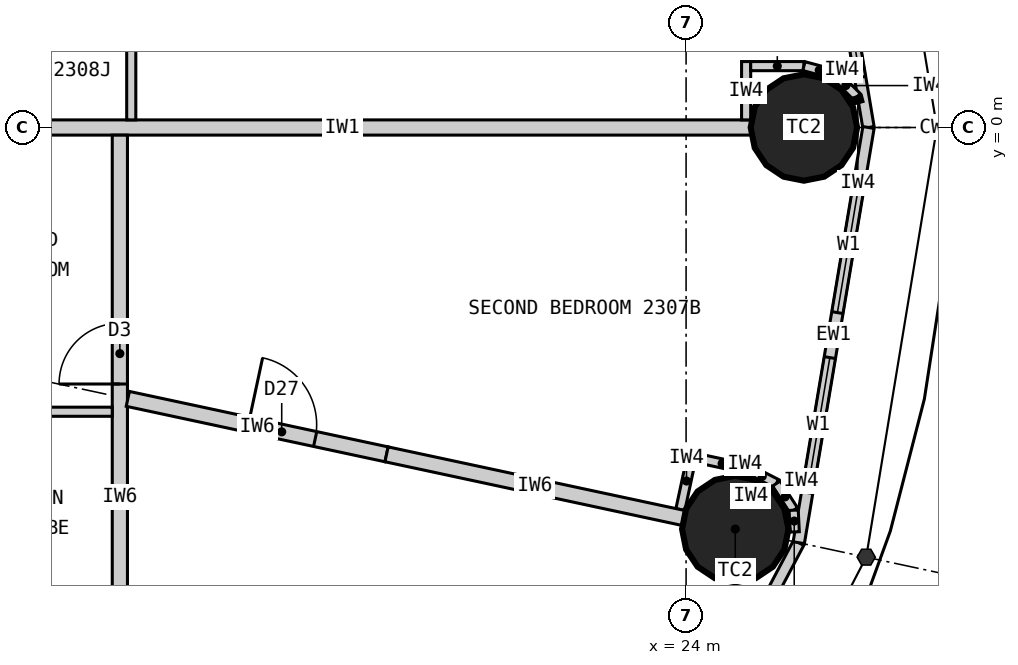
"""IFC4 building model, lengths in metres.
Left out: names, types, materials, properties, quantities, classifications, styles, units other than length and angle.
Written with IfcOpenShell. Run it as: python <this file> out.ifc"""

import sys

from ifc_helpers import new_model, si_unit, direction, frame, frame_2d, origin, origin_2d, place, context, subcontext, project, spatial, rectangle, circle, extrude, clip, halfspace, element, fill, save


model = new_model("IFC4")
c1 = context("Model", 3, precision=1e-05, world=origin(), true_north=direction((0.0, 1.0)))
c2 = subcontext(c1, "Body", "Model", "MODEL_VIEW")
j1 = project(units=[si_unit("LENGTHUNIT", "METRE"), si_unit("PLANEANGLEUNIT", "RADIAN")], contexts=[c1])
p1 = place(None, origin())
s1 = spatial("IfcSite", under=j1, at=p1, CompositionType="ELEMENT")
p2 = place(p1, origin())
s2 = spatial("IfcBuilding", under=s1, at=p2, CompositionType="ELEMENT")
p3 = place(p2, frame((0.0, 0.0, 90.3)))
s3 = spatial("IfcBuildingStorey", under=s2, at=p3, CompositionType="ELEMENT", Elevation=90.3)
for number, where, z_axis, x_axis in (
    (1, (25.55, 0.0, 0.0), (0.0, 0.0, 1.0), (1.0, 0.0, 0.0)),
    (2, (24.647, -5.283, 0.0), (0.0, 0.0, 1.0), (1.0, 0.0, 0.0)),
):
    element("IfcColumn", number, at=place(p3, frame(where, z_axis=z_axis, x_axis=x_axis)), inside=s3, PredefinedType="COLUMN", context=c2, shape_type="Clipping", body=[
        clip(extrude(circle(Radius=0.7, at=origin_2d()), origin(), (0.0, 0.0, 1.0), 3.3), halfspace(frame((0.0, 0.0, 2.25), z_axis=(0.0, 0.0, 1.0), x_axis=(1.0, 0.0, 0.0)), False)),
    ])
p4 = place(p3, frame((26.4, 0.0, 0.0), z_axis=(0.0, 0.0, 1.0), x_axis=(-0.165642551694, 0.986185857264, 0.0)))
e3 = element("IfcWall", 3, at=p4, inside=s3, PredefinedType="ELEMENTEDWALL", context=c2, shape_type="SweptSolid", body=[
    extrude(rectangle(XDim=5.539, YDim=0.15, at=frame_2d((2.77, 0.0))), origin(), (0.0, 0.0, 1.0), 3.05),
])
p5 = place(p4, frame((0.669, 0.0, 0.9)))
e4 = element("IfcOpeningElement", 4, at=p5, cuts=e3, PredefinedType="OPENING", context=c2, shape_type="SweptSolid", body=[
    extrude(rectangle(XDim=1.8, YDim=1.9, at=frame_2d((0.9, 0.95))), frame((0.0, 0.085, 0.0), z_axis=(0.0, -1.0, 0.0), x_axis=(1.0, 0.0, 0.0)), (0.0, 0.0, 1.0), 0.17),
])
p6 = place(p4, frame((3.07, 0.0, 0.9)))
e5 = element("IfcOpeningElement", 5, at=p6, cuts=e3, PredefinedType="OPENING", context=c2, shape_type="SweptSolid", body=[
    extrude(rectangle(XDim=1.8, YDim=1.9, at=frame_2d((0.9, 0.95))), frame((0.0, 0.085, 0.0), z_axis=(0.0, -1.0, 0.0), x_axis=(1.0, 0.0, 0.0)), (0.0, 0.0, 1.0), 0.17),
])
p7 = place(p3, frame((22.803, -10.532, 0.0), z_axis=(0.0, 0.0, 1.0), x_axis=(0.467296867008, 0.884100468321, 0.0)))
e6 = element("IfcWall", 6, at=p7, inside=s3, PredefinedType="ELEMENTEDWALL", context=c2, shape_type="SweptSolid", body=[
    extrude(rectangle(XDim=5.734, YDim=0.15, at=frame_2d((2.867, 0.0))), origin(), (0.0, 0.0, 1.0), 3.05),
])
p8 = place(p7, frame((0.767, 0.0, 0.9)))
e7 = element("IfcOpeningElement", 7, at=p8, cuts=e6, PredefinedType="OPENING", context=c2, shape_type="SweptSolid", body=[
    extrude(rectangle(XDim=1.8, YDim=1.9, at=frame_2d((0.9, 0.95))), frame((0.0, 0.085, 0.0), z_axis=(0.0, -1.0, 0.0), x_axis=(1.0, 0.0, 0.0)), (0.0, 0.0, 1.0), 0.17),
])
p9 = place(p7, frame((3.167, 0.0, 0.9)))
e8 = element("IfcOpeningElement", 8, at=p9, cuts=e6, PredefinedType="OPENING", context=c2, shape_type="SweptSolid", body=[
    extrude(rectangle(XDim=1.8, YDim=1.9, at=frame_2d((0.9, 0.95))), frame((0.0, 0.085, 0.0), z_axis=(0.0, -1.0, 0.0), x_axis=(1.0, 0.0, 0.0)), (0.0, 0.0, 1.0), 0.17),
])
p10 = place(p3, frame((25.482, -5.462, 0.0), z_axis=(0.0, 0.0, 1.0), x_axis=(0.165642551694, 0.986185857264, 0.0)))
e9 = element("IfcWall", 9, at=p10, inside=s3, PredefinedType="ELEMENTEDWALL", context=c2, shape_type="SweptSolid", body=[
    extrude(rectangle(XDim=5.539, YDim=0.15, at=frame_2d((2.77, 0.0))), origin(), (0.0, 0.0, 1.0), 3.05),
])
p11 = place(p10, frame((0.669, 0.0, 0.9)))
e10 = element("IfcOpeningElement", 10, at=p11, cuts=e9, PredefinedType="OPENING", context=c2, shape_type="SweptSolid", body=[
    extrude(rectangle(XDim=1.8, YDim=1.9, at=frame_2d((0.9, 0.95))), frame((0.0, 0.085, 0.0), z_axis=(0.0, -1.0, 0.0), x_axis=(1.0, 0.0, 0.0)), (0.0, 0.0, 1.0), 0.17),
])
p12 = place(p10, frame((3.07, 0.0, 0.9)))
e11 = element("IfcOpeningElement", 11, at=p12, cuts=e9, PredefinedType="OPENING", context=c2, shape_type="SweptSolid", body=[
    extrude(rectangle(XDim=1.8, YDim=1.9, at=frame_2d((0.9, 0.95))), frame((0.0, 0.085, 0.0), z_axis=(0.0, -1.0, 0.0), x_axis=(1.0, 0.0, 0.0)), (0.0, 0.0, 1.0), 0.17),
])
p13 = place(p3, frame((14.1, 0.0, 0.0), z_axis=(0.0, 0.0, 1.0), x_axis=(1.0, 0.0, 0.0)))
e12 = element("IfcWall", 12, at=p13, inside=s3, PredefinedType="PARTITIONING", context=c2, shape_type="SweptSolid", body=[
    extrude(rectangle(XDim=10.75, YDim=0.2, at=frame_2d((5.375, 0.0))), origin(), (0.0, 0.0, 1.0), 2.25),
])
p14 = place(p3, frame((16.55, -9.609, 0.0), z_axis=(0.0, 0.0, 1.0), x_axis=(0.0, 1.0, 0.0)))
e13 = element("IfcWall", 13, at=p14, inside=s3, PredefinedType="PARTITIONING", context=c2, shape_type="SweptSolid", body=[
    extrude(rectangle(XDim=9.508, YDim=0.2, at=frame_2d((4.754, 0.0))), origin(), (0.0, 0.0, 1.0), 3.05),
])
p15 = place(p14, frame((6.234, 0.0, 0.0)))
e14 = element("IfcOpeningElement", 14, at=p15, cuts=e13, PredefinedType="OPENING", context=c2, shape_type="SweptSolid", body=[
    extrude(rectangle(XDim=0.8, YDim=2.1, at=frame_2d((0.4, 1.05))), frame((0.0, 0.11, 0.0), z_axis=(0.0, -1.0, 0.0), x_axis=(1.0, 0.0, 0.0)), (0.0, 0.0, 1.0), 0.22),
])
p16 = place(p3, frame((16.655, -3.57, 0.0), z_axis=(0.0, 0.0, 1.0), x_axis=(0.977788045219, -0.209596132183, 0.0)))
e15 = element("IfcWall", 15, at=p16, inside=s3, PredefinedType="PARTITIONING", context=c2, shape_type="SweptSolid", body=[
    extrude(rectangle(XDim=3.482, YDim=0.2, at=frame_2d((1.741, 0.0))), origin(), (0.0, 0.0, 1.0), 3.05),
])
p17 = place(p16, frame((1.621, 0.0, 0.0)))
e16 = element("IfcOpeningElement", 16, at=p17, cuts=e15, PredefinedType="OPENING", context=c2, shape_type="SweptSolid", body=[
    extrude(rectangle(XDim=0.9, YDim=2.1, at=frame_2d((0.45, 1.05))), frame((0.0, 0.11, 0.0), z_axis=(0.0, -1.0, 0.0), x_axis=(1.0, 0.0, 0.0)), (0.0, 0.0, 1.0), 0.22),
])
p18 = place(p3, frame((14.1, -3.74, 0.0), z_axis=(0.0, 0.0, 1.0), x_axis=(1.0, 0.0, 0.0)))
e17 = element("IfcWall", 17, at=p18, inside=s3, PredefinedType="PARTITIONING", context=c2, shape_type="SweptSolid", body=[
    extrude(rectangle(XDim=2.35, YDim=0.12, at=frame_2d((1.175, 0.0))), origin(), (0.0, 0.0, 1.0), 2.05),
])
p19 = place(p3, frame((16.7, 0.1, 0.0), z_axis=(0.0, 0.0, 1.0), x_axis=(0.0, 1.0, 0.0)))
e18 = element("IfcWall", 18, at=p19, inside=s3, PredefinedType="PARTITIONING", context=c2, shape_type="SweptSolid", body=[
    extrude(rectangle(XDim=2.34, YDim=0.12, at=frame_2d((1.17, 0.0))), origin(), (0.0, 0.0, 1.0), 3.05),
])
p20 = place(p3, frame((24.79, 0.1, 0.0), z_axis=(0.0, 0.0, 1.0), x_axis=(0.0, 1.0, 0.0)))
e19 = element("IfcWall", 19, at=p20, inside=s3, PredefinedType="PARTITIONING", context=c2, shape_type="SweptSolid", body=[
    extrude(rectangle(XDim=0.767, YDim=0.12, at=frame_2d((0.384, 0.0))), origin(), (0.0, 0.0, 1.0), 3.05),
])
p21 = place(p3, frame((24.85, 0.808, 0.0), z_axis=(0.0, 0.0, 1.0), x_axis=(1.0, 0.0, 0.0)))
e20 = element("IfcWall", 20, at=p21, inside=s3, PredefinedType="PARTITIONING", context=c2, shape_type="SweptSolid", body=[
    extrude(rectangle(XDim=0.7, YDim=0.12, at=frame_2d((0.35, 0.0))), origin(), (0.0, 0.0, 1.0), 3.05),
])
p22 = place(p3, frame((25.55, 0.808, 0.0), z_axis=(0.0, 0.0, 1.0), x_axis=(0.965807183573, -0.2592614205, 0.0)))
e21 = element("IfcWall", 21, at=p22, inside=s3, PredefinedType="PARTITIONING", context=c2, shape_type="SweptSolid", body=[
    extrude(rectangle(XDim=0.418, YDim=0.12, at=frame_2d((0.209, 0.0))), origin(), (0.0, 0.0, 1.0), 3.05),
])
p23 = place(p3, frame((25.954, 0.699, 0.0), z_axis=(0.0, 0.0, 1.0), x_axis=(0.707106781187, -0.707106781187, 0.0)))
e22 = element("IfcWall", 22, at=p23, inside=s3, PredefinedType="PARTITIONING", context=c2, shape_type="SweptSolid", body=[
    extrude(rectangle(XDim=0.418, YDim=0.12, at=frame_2d((0.209, 0.0))), origin(), (0.0, 0.0, 1.0), 3.05),
])
p24 = place(p3, frame((26.249, 0.404, 0.0), z_axis=(0.0, 0.0, 1.0), x_axis=(0.259754282609, -0.965674744759, 0.0)))
e23 = element("IfcWall", 23, at=p24, inside=s3, PredefinedType="PARTITIONING", context=c2, shape_type="SweptSolid", body=[
    extrude(rectangle(XDim=0.08, YDim=0.12, at=frame_2d((0.04, 0.0))), origin(), (0.0, 0.0, 1.0), 3.05),
])
p25 = place(p3, frame((23.925, -5.026, 0.0), z_axis=(0.0, 0.0, 1.0), x_axis=(0.209681192172, 0.977769808109, 0.0)))
e24 = element("IfcWall", 24, at=p25, inside=s3, PredefinedType="PARTITIONING", context=c2, shape_type="SweptSolid", body=[
    extrude(rectangle(XDim=0.767, YDim=0.12, at=frame_2d((0.384, 0.0))), origin(), (0.0, 0.0, 1.0), 3.05),
])
p26 = place(p3, frame((24.132, -4.347, 0.0), z_axis=(0.0, 0.0, 1.0), x_axis=(0.977776882509, -0.209648200638, 0.0)))
e25 = element("IfcWall", 25, at=p26, inside=s3, PredefinedType="PARTITIONING", context=c2, shape_type="SweptSolid", body=[
    extrude(rectangle(XDim=0.7, YDim=0.12, at=frame_2d((0.35, 0.0))), origin(), (0.0, 0.0, 1.0), 3.05),
])
for number, where, z_axis, x_axis in (
    (26, (24.816, -4.494, 0.0), (0.0, 0.0, 1.0), (0.89, -0.455, 0.0)),
    (27, (25.188, -4.684, 0.0), (0.0, 0.0, 1.0), (0.543, -0.84, 0.0)),
):
    element("IfcWall", number, at=place(p3, frame(where, z_axis=z_axis, x_axis=x_axis)), inside=s3, PredefinedType="PARTITIONING", context=c2, shape_type="SweptSolid", body=[
        extrude(rectangle(XDim=0.418, YDim=0.12, at=frame_2d((0.209, 0.0))), origin(), (0.0, 0.0, 1.0), 3.05),
    ])
p27 = place(p3, frame((25.416, -5.035, 0.0), z_axis=(0.0, 0.0, 1.0), x_axis=(0.050406329159, -0.998728793007, 0.0)))
e28 = element("IfcWall", 28, at=p27, inside=s3, PredefinedType="PARTITIONING", context=c2, shape_type="SweptSolid", body=[
    extrude(rectangle(XDim=0.286, YDim=0.12, at=frame_2d((0.143, 0.0))), origin(), (0.0, 0.0, 1.0), 3.05),
])
p28 = place(p3, frame((20.059, -4.3, 0.0), z_axis=(0.0, 0.0, 1.0), x_axis=(0.977792568683, -0.209575028637, 0.0)))
e29 = element("IfcWall", 29, at=p28, inside=s3, PredefinedType="PARTITIONING", context=c2, shape_type="SweptSolid", body=[
    extrude(rectangle(XDim=3.992, YDim=0.2, at=frame_2d((1.996, 0.0))), origin(), (0.0, 0.0, 1.0), 2.05),
])
p29 = place(p5, origin())
e30 = element("IfcWindow", 30, at=p29, inside=s3, PartitioningType="SINGLE_PANEL", PredefinedType="WINDOW", context=c2, shape_type="SweptSolid", body=[
    extrude(rectangle(XDim=1.8, YDim=1.9, at=frame_2d((0.9, 0.95))), frame((0.0, 0.03, 0.0), z_axis=(0.0, -1.0, 0.0), x_axis=(1.0, 0.0, 0.0)), (0.0, 0.0, 1.0), 0.06),
])
fill(e4, e30)
p30 = place(p11, origin())
e31 = element("IfcWindow", 31, at=p30, inside=s3, PartitioningType="SINGLE_PANEL", PredefinedType="WINDOW", context=c2, shape_type="SweptSolid", body=[
    extrude(rectangle(XDim=1.8, YDim=1.9, at=frame_2d((0.9, 0.95))), frame((0.0, 0.03, 0.0), z_axis=(0.0, -1.0, 0.0), x_axis=(1.0, 0.0, 0.0)), (0.0, 0.0, 1.0), 0.06),
])
fill(e10, e31)
p31 = place(p12, origin())
e32 = element("IfcWindow", 32, at=p31, inside=s3, PartitioningType="SINGLE_PANEL", PredefinedType="WINDOW", context=c2, shape_type="SweptSolid", body=[
    extrude(rectangle(XDim=1.8, YDim=1.9, at=frame_2d((0.9, 0.95))), frame((0.0, 0.03, 0.0), z_axis=(0.0, -1.0, 0.0), x_axis=(1.0, 0.0, 0.0)), (0.0, 0.0, 1.0), 0.06),
])
fill(e11, e32)
p32 = place(p15, origin())
e33 = element("IfcDoor", 33, at=p32, inside=s3, OperationType="SINGLE_SWING_LEFT", PredefinedType="DOOR", context=c2, shape_type="SweptSolid", body=[
    extrude(rectangle(XDim=0.8, YDim=2.1, at=frame_2d((0.4, 1.05))), frame((0.0, 0.025, 0.0), z_axis=(0.0, -1.0, 0.0), x_axis=(1.0, 0.0, 0.0)), (0.0, 0.0, 1.0), 0.05),
])
fill(e14, e33)
p33 = place(p17, origin())
e34 = element("IfcDoor", 34, at=p33, inside=s3, OperationType="SINGLE_SWING_LEFT", PredefinedType="DOOR", context=c2, shape_type="SweptSolid", body=[
    extrude(rectangle(XDim=0.9, YDim=2.1, at=frame_2d((0.45, 1.05))), frame((0.0, 0.025, 0.0), z_axis=(0.0, -1.0, 0.0), x_axis=(1.0, 0.0, 0.0)), (0.0, 0.0, 1.0), 0.05),
])
fill(e16, e34)
save(model, sys.argv[1])
